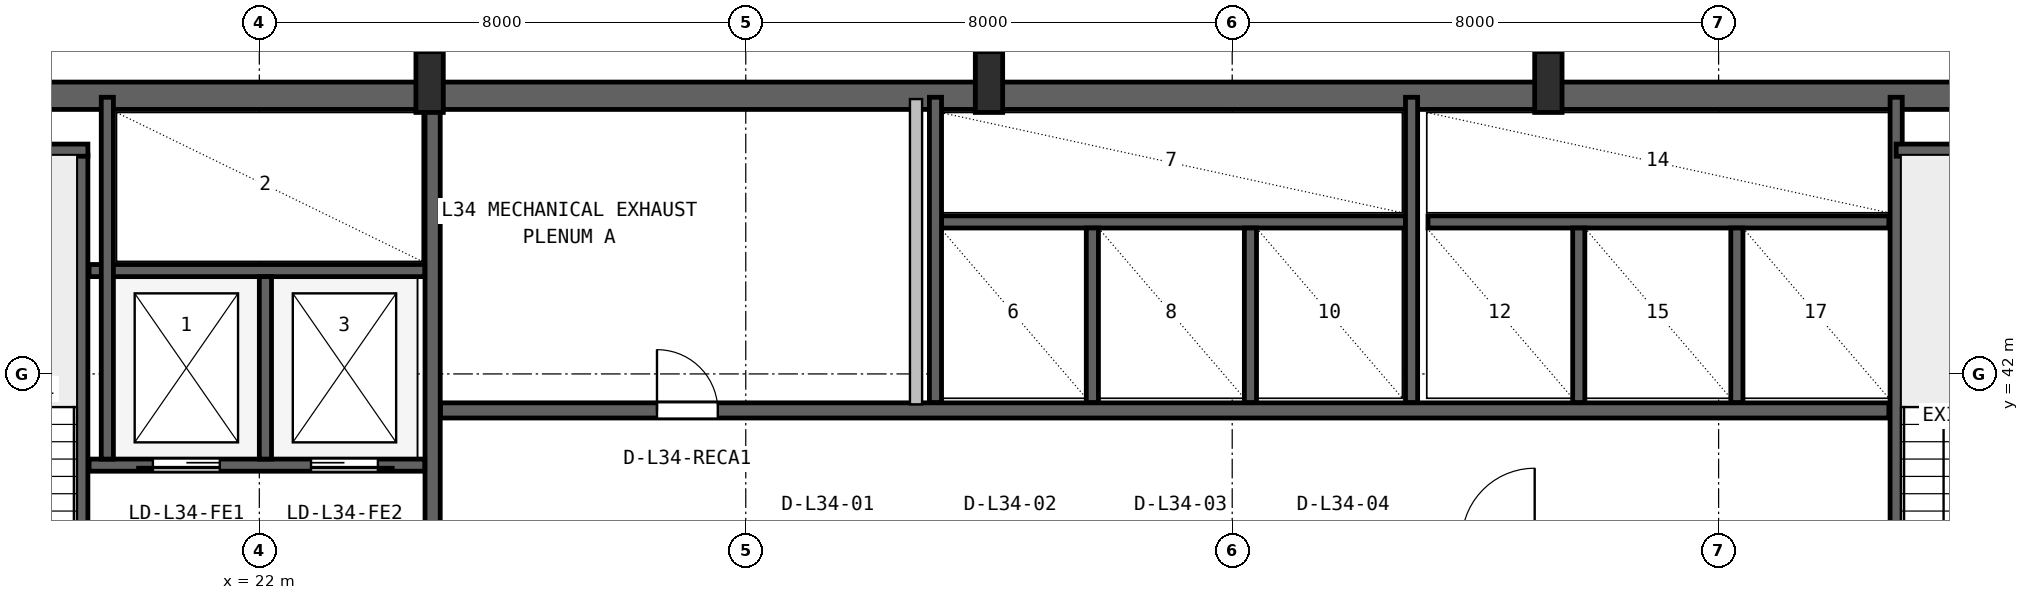
"""IFC4 building model, lengths in metres.
Left out: names, types, materials, properties, quantities, classifications, styles, units other than length and angle.
Written with IfcOpenShell. Run it as: python <this file> out.ifc"""

import sys

from ifc_helpers import new_model, si_unit, direction, frame, frame_2d, origin, origin_2d, place, context, subcontext, project, spatial, rectangle, i_section, extrude, source, transform, mapped, element, fill, save


model = new_model("IFC4")
c1 = context("Model", 3, precision=1e-05, world=origin(), true_north=direction((0.0, 1.0)))
c2 = subcontext(c1, "Body", "Model", "MODEL_VIEW")
j1 = project(units=[si_unit("LENGTHUNIT", "METRE"), si_unit("PLANEANGLEUNIT", "RADIAN")], contexts=[c1])
p1 = place(None, origin())
s1 = spatial("IfcSite", under=j1, at=p1, CompositionType="ELEMENT")
p2 = place(p1, origin())
s2 = spatial("IfcBuilding", under=s1, at=p2, CompositionType="ELEMENT")
p3 = place(p2, frame((0.0, 0.0, 141.0)))
s3 = spatial("IfcBuildingStorey", under=s2, at=p3, CompositionType="ELEMENT", Elevation=141.0)
p4 = place(p3, frame((15.6, 46.575, 0.0), z_axis=(0.0, 0.0, 1.0), x_axis=(1.0, 0.0, 0.0)))
e1 = element("IfcWall", 1, at=p4, inside=s3, PredefinedType="SHEAR", context=c2, shape_type="SweptSolid", body=[
    extrude(rectangle(XDim=36.8, YDim=0.45, at=frame_2d((18.4, 0.0))), origin(), (0.0, 0.0, 1.0), 4.55),
])
m1 = source(origin(), c2, "Body", "SweptSolid", [
    extrude(i_section(OverallWidth=0.45, OverallDepth=1.0, WebThickness=0.016, FlangeThickness=0.03, FilletRadius=0.016, at=origin_2d()), origin(), (0.0, 0.0, 1.0), 4.8),
])
for number, where, z_axis, x_axis in (
    (2, (24.8, 46.8, 0.0), (0.0, 0.0, 1.0), (1.0, 0.0, 0.0)),
    (3, (34.0, 46.8, 0.0), (0.0, 0.0, 1.0), (1.0, 0.0, 0.0)),
    (4, (43.2, 46.8, 0.0), (0.0, 0.0, 1.0), (1.0, 0.0, 0.0)),
):
    element("IfcColumn", number, at=place(p3, frame(where, z_axis=z_axis, x_axis=x_axis)), inside=s3, PredefinedType="COLUMN", context=c2, shape_type="MappedRepresentation", body=[
        mapped(m1, transform((0.0, 0.0, 0.0), x_axis=(1.0, 0.0, 0.0), y_axis=(0.0, 1.0, 0.0), z_axis=(0.0, 0.0, 1.0), scale=1.0)),
    ])
p5 = place(p3, frame((19.08, 35.95, 0.0), z_axis=(0.0, 0.0, 1.0), x_axis=(0.0, 1.0, 0.0)))
e5 = element("IfcWall", 5, at=p5, inside=s3, PredefinedType="SHEAR", context=c2, shape_type="SweptSolid", body=[
    extrude(rectangle(XDim=9.65, YDim=0.2, at=frame_2d((4.825, 0.0))), origin(), (0.0, 0.0, 1.0), 4.55),
])
p6 = place(p5, frame((0.25, 0.0, 0.0)))
e6 = element("IfcOpeningElement", 6, at=p6, cuts=e5, PredefinedType="OPENING", context=c2, shape_type="SweptSolid", body=[
    extrude(rectangle(XDim=0.95, YDim=2.1, at=frame_2d((0.475, 1.05))), frame((0.0, 0.11, 0.0), z_axis=(0.0, -1.0, 0.0), x_axis=(1.0, 0.0, 0.0)), (0.0, 0.0, 1.0), 0.22),
])
p7 = place(p3, frame((15.95, 45.68, 0.0), z_axis=(0.0, 0.0, 1.0), x_axis=(1.0, 0.0, 0.0)))
e7 = element("IfcWall", 7, at=p7, inside=s3, PredefinedType="SHEAR", context=c2, shape_type="SweptSolid", body=[
    extrude(rectangle(XDim=3.23, YDim=0.2, at=frame_2d((1.615, 0.0))), origin(), (0.0, 0.0, 1.0), 4.55),
])
p8 = place(p3, frame((24.85, 36.05, 0.0), z_axis=(0.0, 0.0, 1.0), x_axis=(0.0, 1.0, 0.0)))
e8 = element("IfcWall", 8, at=p8, inside=s3, PredefinedType="SHEAR", context=c2, shape_type="SweptSolid", body=[
    extrude(rectangle(XDim=10.45, YDim=0.25, at=frame_2d((5.225, 0.0))), origin(), (0.0, 0.0, 1.0), 4.55),
])
p9 = place(p3, frame((19.2, 40.5, 0.0), z_axis=(0.0, 0.0, 1.0), x_axis=(1.0, 0.0, 0.0)))
e9 = element("IfcWall", 9, at=p9, inside=s3, PredefinedType="SHEAR", context=c2, shape_type="SweptSolid", body=[
    extrude(rectangle(XDim=5.52, YDim=0.2, at=frame_2d((2.76, 0.0))), origin(), (0.0, 0.0, 1.0), 4.55),
])
p10 = place(p9, frame((1.05, 0.0, 0.0)))
e10 = element("IfcOpeningElement", 10, at=p10, cuts=e9, PredefinedType="OPENING", context=c2, shape_type="SweptSolid", body=[
    extrude(rectangle(XDim=1.1, YDim=2.18, at=frame_2d((0.55, 1.09))), frame((0.0, 0.11, 0.0), z_axis=(0.0, -1.0, 0.0), x_axis=(1.0, 0.0, 0.0)), (0.0, 0.0, 1.0), 0.22),
])
p11 = place(p9, frame((3.65, 0.0, 0.0)))
e11 = element("IfcOpeningElement", 11, at=p11, cuts=e9, PredefinedType="OPENING", context=c2, shape_type="SweptSolid", body=[
    extrude(rectangle(XDim=1.1, YDim=2.18, at=frame_2d((0.55, 1.09))), frame((0.0, 0.11, 0.0), z_axis=(0.0, -1.0, 0.0), x_axis=(1.0, 0.0, 0.0)), (0.0, 0.0, 1.0), 0.22),
])
p12 = place(p3, frame((19.2, 43.7, 0.0), z_axis=(0.0, 0.0, 1.0), x_axis=(1.0, 0.0, 0.0)))
e12 = element("IfcWall", 12, at=p12, inside=s3, PredefinedType="SHEAR", context=c2, shape_type="SweptSolid", body=[
    extrude(rectangle(XDim=5.52, YDim=0.2, at=frame_2d((2.76, 0.0))), origin(), (0.0, 0.0, 1.0), 4.55),
])
p13 = place(p3, frame((22.1, 40.6, 0.0), z_axis=(0.0, 0.0, 1.0), x_axis=(0.0, 1.0, 0.0)))
e13 = element("IfcWall", 13, at=p13, inside=s3, PredefinedType="SHEAR", context=c2, shape_type="SweptSolid", body=[
    extrude(rectangle(XDim=3.0, YDim=0.2, at=frame_2d((1.5, 0.0))), origin(), (0.0, 0.0, 1.0), 4.55),
])
p14 = place(p3, frame((19.5, 40.6, 0.0), z_axis=(0.0, 0.0, 1.0), x_axis=(0.0, 1.0, 0.0)))
e14 = element("IfcWall", 14, at=p14, inside=s3, PredefinedType="SHEAR", context=c2, shape_type="SweptSolid", body=[
    extrude(rectangle(XDim=5.95, YDim=0.2, at=frame_2d((2.975, 0.0))), origin(), (0.0, 0.0, 1.0), 4.55),
])
p15 = place(p3, frame((48.92, 36.05, 0.0), z_axis=(0.0, 0.0, 1.0), x_axis=(0.0, 1.0, 0.0)))
e15 = element("IfcWall", 15, at=p15, inside=s3, PredefinedType="SHEAR", context=c2, shape_type="SweptSolid", body=[
    extrude(rectangle(XDim=10.5, YDim=0.2, at=frame_2d((5.25, 0.0))), origin(), (0.0, 0.0, 1.0), 4.55),
])
p16 = place(p3, frame((48.92, 45.68, 0.0), z_axis=(0.0, 0.0, 1.0), x_axis=(1.0, 0.0, 0.0)))
e16 = element("IfcWall", 16, at=p16, inside=s3, PredefinedType="SHEAR", context=c2, shape_type="SweptSolid", body=[
    extrude(rectangle(XDim=3.18, YDim=0.2, at=frame_2d((1.59, 0.0))), origin(), (0.0, 0.0, 1.0), 4.55),
])
p17 = place(p3, frame((24.98, 41.4, 0.0), z_axis=(0.0, 0.0, 1.0), x_axis=(1.0, 0.0, 0.0)))
e17 = element("IfcWall", 17, at=p17, inside=s3, PredefinedType="SHEAR", context=c2, shape_type="SweptSolid", body=[
    extrude(rectangle(XDim=23.82, YDim=0.25, at=frame_2d((11.91, 0.0))), origin(), (0.0, 0.0, 1.0), 4.55),
])
p18 = place(p17, frame((3.56, 0.0, 0.0)))
e18 = element("IfcOpeningElement", 18, at=p18, cuts=e17, PredefinedType="OPENING", context=c2, shape_type="SweptSolid", body=[
    extrude(rectangle(XDim=1.0, YDim=2.08, at=frame_2d((0.5, 1.04))), frame((0.0, 0.135, 0.0), z_axis=(0.0, -1.0, 0.0), x_axis=(1.0, 0.0, 0.0)), (0.0, 0.0, 1.0), 0.27),
])
p19 = place(p3, frame((33.22, 44.5, 0.0), z_axis=(0.0, 0.0, 1.0), x_axis=(1.0, 0.0, 0.0)))
e19 = element("IfcWall", 19, at=p19, inside=s3, PredefinedType="SHEAR", context=c2, shape_type="SweptSolid", body=[
    extrude(rectangle(XDim=7.63, YDim=0.2, at=frame_2d((3.815, 0.0))), origin(), (0.0, 0.0, 1.0), 4.55),
])
p20 = place(p3, frame((33.12, 41.53, 0.0), z_axis=(0.0, 0.0, 1.0), x_axis=(0.0, 1.0, 0.0)))
e20 = element("IfcWall", 20, at=p20, inside=s3, PredefinedType="SHEAR", context=c2, shape_type="SweptSolid", body=[
    extrude(rectangle(XDim=5.02, YDim=0.2, at=frame_2d((2.51, 0.0))), origin(), (0.0, 0.0, 1.0), 4.55),
])
for number, where, z_axis, x_axis in (
    (21, (35.7, 41.53, 0.0), (0.0, 0.0, 1.0), (0.0, 1.0, 0.0)),
    (22, (38.3, 41.53, 0.0), (0.0, 0.0, 1.0), (0.0, 1.0, 0.0)),
):
    element("IfcWall", number, at=place(p3, frame(where, z_axis=z_axis, x_axis=x_axis)), inside=s3, PredefinedType="SHEAR", context=c2, shape_type="SweptSolid", body=[
        extrude(rectangle(XDim=2.87, YDim=0.2, at=frame_2d((1.435, 0.0))), origin(), (0.0, 0.0, 1.0), 4.55),
    ])
p21 = place(p3, frame((40.95, 41.53, 0.0), z_axis=(0.0, 0.0, 1.0), x_axis=(0.0, 1.0, 0.0)))
e23 = element("IfcWall", 23, at=p21, inside=s3, PredefinedType="SHEAR", context=c2, shape_type="SweptSolid", body=[
    extrude(rectangle(XDim=5.02, YDim=0.2, at=frame_2d((2.51, 0.0))), origin(), (0.0, 0.0, 1.0), 4.55),
])
p22 = place(p3, frame((41.22, 44.5, 0.0), z_axis=(0.0, 0.0, 1.0), x_axis=(1.0, 0.0, 0.0)))
e24 = element("IfcWall", 24, at=p22, inside=s3, PredefinedType="SHEAR", context=c2, shape_type="SweptSolid", body=[
    extrude(rectangle(XDim=7.58, YDim=0.2, at=frame_2d((3.79, 0.0))), origin(), (0.0, 0.0, 1.0), 4.55),
])
for number, where, z_axis, x_axis in (
    (25, (43.7, 41.53, 0.0), (0.0, 0.0, 1.0), (0.0, 1.0, 0.0)),
    (26, (46.3, 41.53, 0.0), (0.0, 0.0, 1.0), (0.0, 1.0, 0.0)),
):
    element("IfcWall", number, at=place(p3, frame(where, z_axis=z_axis, x_axis=x_axis)), inside=s3, PredefinedType="SHEAR", context=c2, shape_type="SweptSolid", body=[
        extrude(rectangle(XDim=2.87, YDim=0.2, at=frame_2d((1.435, 0.0))), origin(), (0.0, 0.0, 1.0), 4.55),
    ])
p23 = place(p3, frame((32.8, 41.5, 0.0), z_axis=(0.0, 0.0, 1.0), x_axis=(0.0, 1.0, 0.0)))
e27 = element("IfcWall", 27, at=p23, inside=s3, PredefinedType="SOLIDWALL", context=c2, shape_type="SweptSolid", body=[
    extrude(rectangle(XDim=5.02, YDim=0.2, at=frame_2d((2.51, 0.0))), origin(), (0.0, 0.0, 1.0), 4.53),
])
m2 = source(origin(), c2, "Body", "SweptSolid", [
    extrude(rectangle(XDim=1.1, YDim=2.18, at=frame_2d((0.55, 1.09))), frame((0.0, 0.025, 0.0), z_axis=(0.0, -1.0, 0.0), x_axis=(1.0, 0.0, 0.0)), (0.0, 0.0, 1.0), 0.05),
])
p24 = place(p10, frame((1.1, 0.0, 0.0), z_axis=(0.0, 0.0, 1.0), x_axis=(-1.0, 0.0, 0.0)))
e28 = element("IfcDoor", 28, at=p24, inside=s3, OperationType="SLIDING_TO_LEFT", PredefinedType="DOOR", context=c2, shape_type="MappedRepresentation", body=[
    mapped(m2, transform((0.0, 0.0, 0.0), x_axis=(1.0, 0.0, 0.0), y_axis=(0.0, 1.0, 0.0), z_axis=(0.0, 0.0, 1.0), scale=1.0)),
])
fill(e10, e28)
p25 = place(p11, frame((1.1, 0.0, 0.0), z_axis=(0.0, 0.0, 1.0), x_axis=(-1.0, 0.0, 0.0)))
e29 = element("IfcDoor", 29, at=p25, inside=s3, OperationType="SLIDING_TO_RIGHT", PredefinedType="DOOR", context=c2, shape_type="MappedRepresentation", body=[
    mapped(m2, transform((0.0, 0.0, 0.0), x_axis=(1.0, 0.0, 0.0), y_axis=(0.0, 1.0, 0.0), z_axis=(0.0, 0.0, 1.0), scale=1.0)),
])
fill(e11, e29)
m3 = source(origin(), c2, "Body", "SweptSolid", [
    extrude(rectangle(XDim=1.0, YDim=2.08, at=frame_2d((0.5, 1.04))), frame((0.0, 0.025, 0.0), z_axis=(0.0, -1.0, 0.0), x_axis=(1.0, 0.0, 0.0)), (0.0, 0.0, 1.0), 0.05),
])
p26 = place(p18, origin())
e30 = element("IfcDoor", 30, at=p26, inside=s3, OperationType="SINGLE_SWING_LEFT", PredefinedType="DOOR", context=c2, shape_type="MappedRepresentation", body=[
    mapped(m3, transform((0.0, 0.0, 0.0), x_axis=(1.0, 0.0, 0.0), y_axis=(0.0, 1.0, 0.0), z_axis=(0.0, 0.0, 1.0), scale=1.0)),
])
fill(e18, e30)
save(model, sys.argv[1])
